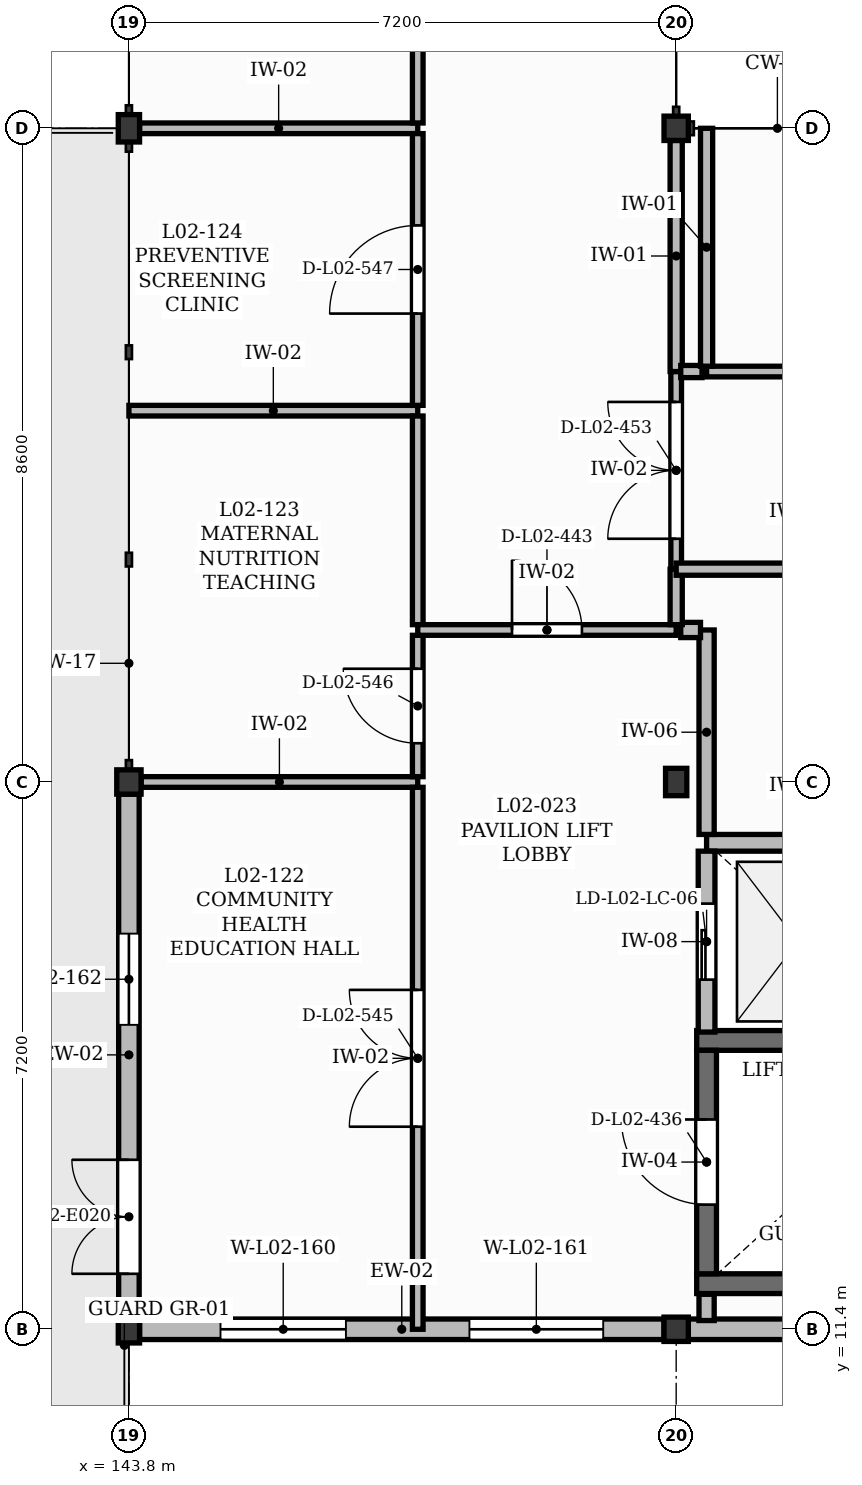
"""IFC4 building model, lengths in metres.
Left out: names, types, materials, properties, quantities, classifications, styles, units other than length and angle.
Written with IfcOpenShell. Run it as: python <this file> out.ifc"""

import sys

from ifc_helpers import new_model, si_unit, direction, frame, frame_2d, origin, origin_2d, place, context, subcontext, project, spatial, rectangle, extrude, element, fill, save


model = new_model("IFC4")
c1 = context("Model", 3, precision=1e-05, world=origin(), true_north=direction((0.0, 1.0)))
c2 = subcontext(c1, "Body", "Model", "MODEL_VIEW")
j1 = project(units=[si_unit("LENGTHUNIT", "METRE"), si_unit("PLANEANGLEUNIT", "RADIAN")], contexts=[c1])
p1 = place(None, origin())
s1 = spatial("IfcSite", under=j1, at=p1, CompositionType="ELEMENT")
p2 = place(p1, origin())
s2 = spatial("IfcBuilding", under=s1, at=p2, CompositionType="ELEMENT")
p3 = place(p2, frame((0.0, 0.0, 9.0)))
s3 = spatial("IfcBuildingStorey", under=s2, at=p3, CompositionType="ELEMENT", Elevation=9.0)
p4 = place(p3, frame((143.8, 11.4, 0.0), z_axis=(0.0, 0.0, 1.0), x_axis=(1.0, 0.0, 0.0)))
e1 = element("IfcColumn", 1, at=p4, inside=s3, PredefinedType="COLUMN", context=c2, shape_type="SweptSolid", body=[
    extrude(rectangle(XDim=0.28, YDim=0.36, at=origin_2d()), origin(), (0.0, 0.0, 1.0), 3.98),
])
p5 = place(p3, frame((143.8, 18.6, 0.0), z_axis=(0.0, 0.0, 1.0), x_axis=(1.0, 0.0, 0.0)))
e2 = element("IfcColumn", 2, at=p5, inside=s3, PredefinedType="COLUMN", context=c2, shape_type="SweptSolid", body=[
    extrude(rectangle(XDim=0.32, YDim=0.32, at=origin_2d()), origin(), (0.0, 0.0, 1.0), 3.98),
])
p6 = place(p3, frame((143.8, 27.2, 0.0), z_axis=(0.0, 0.0, 1.0), x_axis=(1.0, 0.0, 0.0)))
e3 = element("IfcColumn", 3, at=p6, inside=s3, PredefinedType="COLUMN", context=c2, shape_type="SweptSolid", body=[
    extrude(rectangle(XDim=0.28, YDim=0.36, at=origin_2d()), origin(), (0.0, 0.0, 1.0), 3.98),
])
p7 = place(p3, frame((151.0, 11.4, 0.0), z_axis=(0.0, 0.0, 1.0), x_axis=(1.0, 0.0, 0.0)))
e4 = element("IfcColumn", 4, at=p7, inside=s3, PredefinedType="COLUMN", context=c2, shape_type="SweptSolid", body=[
    extrude(rectangle(XDim=0.32, YDim=0.32, at=origin_2d()), origin(), (0.0, 0.0, 1.0), 5.775),
])
p8 = place(p3, frame((151.0, 18.6, 0.0), z_axis=(0.0, 0.0, 1.0), x_axis=(1.0, 0.0, 0.0)))
e5 = element("IfcColumn", 5, at=p8, inside=s3, PredefinedType="COLUMN", context=c2, shape_type="SweptSolid", body=[
    extrude(rectangle(XDim=0.28, YDim=0.36, at=origin_2d()), origin(), (0.0, 0.0, 1.0), 5.775),
])
p9 = place(p3, frame((151.0, 27.2, 0.0), z_axis=(0.0, 0.0, 1.0), x_axis=(1.0, 0.0, 0.0)))
e6 = element("IfcColumn", 6, at=p9, inside=s3, PredefinedType="COLUMN", context=c2, shape_type="SweptSolid", body=[
    extrude(rectangle(XDim=0.32, YDim=0.32, at=origin_2d()), origin(), (0.0, 0.0, 1.0), 5.775),
])
p10 = place(p3, frame((143.94, 11.4, 0.0), z_axis=(0.0, 0.0, 1.0), x_axis=(1.0, 0.0, 0.0)))
e7 = element("IfcWall", 7, at=p10, inside=s3, PredefinedType="SOLIDWALL", context=c2, shape_type="SweptSolid", body=[
    extrude(rectangle(XDim=6.9, YDim=0.27, at=frame_2d((3.45, 0.0))), origin(), (0.0, 0.0, 1.0), 3.54),
])
p11 = place(p10, frame((1.065, 0.0, 1.35)))
e8 = element("IfcOpeningElement", 8, at=p11, cuts=e7, PredefinedType="OPENING", context=c2, shape_type="SweptSolid", body=[
    extrude(rectangle(XDim=1.65, YDim=1.4, at=frame_2d((0.825, 0.7))), frame((0.0, 0.145, 0.0), z_axis=(0.0, -1.0, 0.0), x_axis=(1.0, 0.0, 0.0)), (0.0, 0.0, 1.0), 0.29),
])
p12 = place(p10, frame((4.34, 0.0, 1.0)))
e9 = element("IfcOpeningElement", 9, at=p12, cuts=e7, PredefinedType="OPENING", context=c2, shape_type="SweptSolid", body=[
    extrude(rectangle(XDim=1.76, YDim=1.95, at=frame_2d((0.88, 0.975))), frame((0.0, 0.145, 0.0), z_axis=(0.0, -1.0, 0.0), x_axis=(1.0, 0.0, 0.0)), (0.0, 0.0, 1.0), 0.29),
])
p13 = place(p3, frame((143.8, 11.58, 0.0), z_axis=(0.0, 0.0, 1.0), x_axis=(0.0, 1.0, 0.0)))
e10 = element("IfcWall", 10, at=p13, inside=s3, PredefinedType="SOLIDWALL", context=c2, shape_type="SweptSolid", body=[
    extrude(rectangle(XDim=6.86, YDim=0.27, at=frame_2d((3.43, 0.0))), origin(), (0.0, 0.0, 1.0), 4.0),
])
p14 = place(p13, frame((0.55, 0.0, 0.0)))
e11 = element("IfcOpeningElement", 11, at=p14, cuts=e10, PredefinedType="OPENING", context=c2, shape_type="SweptSolid", body=[
    extrude(rectangle(XDim=1.5, YDim=2.3, at=frame_2d((0.75, 1.15))), frame((0.0, 0.145, 0.0), z_axis=(0.0, -1.0, 0.0), x_axis=(1.0, 0.0, 0.0)), (0.0, 0.0, 1.0), 0.29),
])
p15 = place(p13, frame((3.825, 0.0, 1.0)))
e12 = element("IfcOpeningElement", 12, at=p15, cuts=e10, PredefinedType="OPENING", context=c2, shape_type="SweptSolid", body=[
    extrude(rectangle(XDim=1.2, YDim=1.95, at=frame_2d((0.6, 0.975))), frame((0.0, 0.145, 0.0), z_axis=(0.0, -1.0, 0.0), x_axis=(1.0, 0.0, 0.0)), (0.0, 0.0, 1.0), 0.29),
])
p16 = place(p3, frame((151.16, 11.4, 0.0), z_axis=(0.0, 0.0, 1.0), x_axis=(1.0, 0.0, 0.0)))
e13 = element("IfcWall", 13, at=p16, inside=s3, PredefinedType="SOLIDWALL", context=c2, shape_type="SweptSolid", body=[
    extrude(rectangle(XDim=6.9, YDim=0.27, at=frame_2d((3.45, 0.0))), origin(), (0.0, 0.0, 1.0), 3.54),
])
for number, where, z_axis, x_axis in (
    (14, (151.27, 12.0, 0.0), (0.0, 0.0, 1.0), (1.0, 0.0, 0.0)),
    (15, (151.27, 15.2, 0.0), (0.0, 0.0, 1.0), (1.0, 0.0, 0.0)),
):
    element("IfcWall", number, at=place(p3, frame(where, z_axis=z_axis, x_axis=x_axis)), inside=s3, PredefinedType="SHEAR", context=c2, shape_type="SweptSolid", body=[
        extrude(rectangle(XDim=6.66, YDim=0.26, at=frame_2d((3.33, 0.0))), origin(), (0.0, 0.0, 1.0), 3.95),
    ])
p17 = place(p3, frame((151.4, 12.13, 0.0), z_axis=(0.0, 0.0, 1.0), x_axis=(0.0, 1.0, 0.0)))
e16 = element("IfcWall", 16, at=p17, inside=s3, PredefinedType="SHEAR", context=c2, shape_type="SweptSolid", body=[
    extrude(rectangle(XDim=2.94, YDim=0.26, at=frame_2d((1.47, 0.0))), origin(), (0.0, 0.0, 1.0), 3.95),
])
p18 = place(p17, frame((0.91, 0.0, 0.0)))
e17 = element("IfcOpeningElement", 17, at=p18, cuts=e16, PredefinedType="OPENING", context=c2, shape_type="SweptSolid", body=[
    extrude(rectangle(XDim=1.12, YDim=2.1, at=frame_2d((0.56, 1.05))), frame((0.0, 0.14, 0.0), z_axis=(0.0, -1.0, 0.0), x_axis=(1.0, 0.0, 0.0)), (0.0, 0.0, 1.0), 0.28),
])
p19 = place(p3, frame((151.4, 17.8, 0.0), z_axis=(0.0, 0.0, 1.0), x_axis=(1.0, 0.0, 0.0)))
e18 = element("IfcWall", 18, at=p19, inside=s3, PredefinedType="SOLIDWALL", context=c2, shape_type="SweptSolid", body=[
    extrude(rectangle(XDim=2.4, YDim=0.22, at=frame_2d((1.2, 0.0))), origin(), (0.0, 0.0, 1.0), 3.95),
])
p20 = place(p3, frame((151.4, 15.31, 0.0), z_axis=(0.0, 0.0, 1.0), x_axis=(0.0, 1.0, 0.0)))
e19 = element("IfcWall", 19, at=p20, inside=s3, PredefinedType="SOLIDWALL", context=c2, shape_type="SweptSolid", body=[
    extrude(rectangle(XDim=2.38, YDim=0.22, at=frame_2d((1.19, 0.0))), origin(), (0.0, 0.0, 1.0), 3.95),
])
p21 = place(p20, frame((0.69, 0.0, 0.0)))
e20 = element("IfcOpeningElement", 20, at=p21, cuts=e19, PredefinedType="OPENING", context=c2, shape_type="SweptSolid", body=[
    extrude(rectangle(XDim=1.0, YDim=2.15, at=frame_2d((0.5, 1.075))), frame((0.0, 0.12, 0.0), z_axis=(0.0, -1.0, 0.0), x_axis=(1.0, 0.0, 0.0)), (0.0, 0.0, 1.0), 0.24),
])
p22 = place(p3, frame((143.96, 18.6, 0.0), z_axis=(0.0, 0.0, 1.0), x_axis=(1.0, 0.0, 0.0)))
e21 = element("IfcWall", 21, at=p22, inside=s3, PredefinedType="PARTITIONING", context=c2, shape_type="SweptSolid", body=[
    extrude(rectangle(XDim=3.64, YDim=0.14, at=frame_2d((1.82, 0.0))), origin(), (0.0, 0.0, 1.0), 3.78),
])
p23 = place(p3, frame((143.8, 23.485, 0.0), z_axis=(0.0, 0.0, 1.0), x_axis=(1.0, 0.0, 0.0)))
e22 = element("IfcWall", 22, at=p23, inside=s3, PredefinedType="PARTITIONING", context=c2, shape_type="SweptSolid", body=[
    extrude(rectangle(XDim=3.8, YDim=0.14, at=frame_2d((1.9, 0.0))), origin(), (0.0, 0.0, 1.0), 3.78),
])
p24 = place(p3, frame((143.94, 27.2, 0.0), z_axis=(0.0, 0.0, 1.0), x_axis=(1.0, 0.0, 0.0)))
e23 = element("IfcWall", 23, at=p24, inside=s3, PredefinedType="PARTITIONING", context=c2, shape_type="SweptSolid", body=[
    extrude(rectangle(XDim=3.66, YDim=0.14, at=frame_2d((1.83, 0.0))), origin(), (0.0, 0.0, 1.0), 3.78),
])
p25 = place(p3, frame((147.6, 11.4, 0.0), z_axis=(0.0, 0.0, 1.0), x_axis=(0.0, 1.0, 0.0)))
e24 = element("IfcWall", 24, at=p25, inside=s3, PredefinedType="PARTITIONING", context=c2, shape_type="SweptSolid", body=[
    extrude(rectangle(XDim=7.13, YDim=0.14, at=frame_2d((3.565, 0.0))), origin(), (0.0, 0.0, 1.0), 3.78),
])
p26 = place(p25, frame((2.665, 0.0, 0.0)))
e25 = element("IfcOpeningElement", 25, at=p26, cuts=e24, PredefinedType="OPENING", context=c2, shape_type="SweptSolid", body=[
    extrude(rectangle(XDim=1.8, YDim=2.3, at=frame_2d((0.9, 1.15))), frame((0.0, 0.08, 0.0), z_axis=(0.0, -1.0, 0.0), x_axis=(1.0, 0.0, 0.0)), (0.0, 0.0, 1.0), 0.16),
])
p27 = place(p3, frame((147.6, 18.67, 0.0), z_axis=(0.0, 0.0, 1.0), x_axis=(0.0, 1.0, 0.0)))
e26 = element("IfcWall", 26, at=p27, inside=s3, PredefinedType="PARTITIONING", context=c2, shape_type="SweptSolid", body=[
    extrude(rectangle(XDim=1.86, YDim=0.14, at=frame_2d((0.93, 0.0))), origin(), (0.0, 0.0, 1.0), 3.78),
])
p28 = place(p27, frame((0.44, 0.0, 0.0)))
e27 = element("IfcOpeningElement", 27, at=p28, cuts=e26, PredefinedType="OPENING", context=c2, shape_type="SweptSolid", body=[
    extrude(rectangle(XDim=0.98, YDim=2.15, at=frame_2d((0.49, 1.075))), frame((0.0, 0.08, 0.0), z_axis=(0.0, -1.0, 0.0), x_axis=(1.0, 0.0, 0.0)), (0.0, 0.0, 1.0), 0.16),
])
p29 = place(p3, frame((147.6, 20.67, 0.0), z_axis=(0.0, 0.0, 1.0), x_axis=(0.0, 1.0, 0.0)))
e28 = element("IfcWall", 28, at=p29, inside=s3, PredefinedType="PARTITIONING", context=c2, shape_type="SweptSolid", body=[
    extrude(rectangle(XDim=2.745, YDim=0.14, at=frame_2d((1.373, 0.0))), origin(), (0.0, 0.0, 1.0), 3.78),
])
p30 = place(p3, frame((147.6, 20.6, 0.0), z_axis=(0.0, 0.0, 1.0), x_axis=(1.0, 0.0, 0.0)))
e29 = element("IfcWall", 29, at=p30, inside=s3, PredefinedType="PARTITIONING", context=c2, shape_type="SweptSolid", body=[
    extrude(rectangle(XDim=3.4, YDim=0.14, at=frame_2d((1.7, 0.0))), origin(), (0.0, 0.0, 1.0), 3.78),
])
p31 = place(p30, frame((1.24, 0.0, 0.0)))
e30 = element("IfcOpeningElement", 30, at=p31, cuts=e29, PredefinedType="OPENING", context=c2, shape_type="SweptSolid", body=[
    extrude(rectangle(XDim=0.92, YDim=2.1, at=frame_2d((0.46, 1.05))), frame((0.0, 0.08, 0.0), z_axis=(0.0, -1.0, 0.0), x_axis=(1.0, 0.0, 0.0)), (0.0, 0.0, 1.0), 0.16),
])
p32 = place(p3, frame((147.6, 23.555, 0.0), z_axis=(0.0, 0.0, 1.0), x_axis=(0.0, 1.0, 0.0)))
e31 = element("IfcWall", 31, at=p32, inside=s3, PredefinedType="PARTITIONING", context=c2, shape_type="SweptSolid", body=[
    extrude(rectangle(XDim=3.575, YDim=0.14, at=frame_2d((1.788, 0.0))), origin(), (0.0, 0.0, 1.0), 3.78),
])
p33 = place(p32, frame((1.208, 0.0, 0.0)))
e32 = element("IfcOpeningElement", 32, at=p33, cuts=e31, PredefinedType="OPENING", context=c2, shape_type="SweptSolid", body=[
    extrude(rectangle(XDim=1.16, YDim=2.1, at=frame_2d((0.58, 1.05))), frame((0.0, 0.08, 0.0), z_axis=(0.0, -1.0, 0.0), x_axis=(1.0, 0.0, 0.0)), (0.0, 0.0, 1.0), 0.16),
])
p34 = place(p3, frame((147.6, 27.27, 0.0), z_axis=(0.0, 0.0, 1.0), x_axis=(0.0, 1.0, 0.0)))
e33 = element("IfcWall", 33, at=p34, inside=s3, PredefinedType="PARTITIONING", context=c2, shape_type="SweptSolid", body=[
    extrude(rectangle(XDim=5.226, YDim=0.14, at=frame_2d((2.613, 0.0))), origin(), (0.0, 0.0, 1.0), 3.78),
])
p35 = place(p34, frame((1.713, 0.0, 0.0)))
e34 = element("IfcOpeningElement", 34, at=p35, cuts=e33, PredefinedType="OPENING", context=c2, shape_type="SweptSolid", body=[
    extrude(rectangle(XDim=1.8, YDim=2.3, at=frame_2d((0.9, 1.15))), frame((0.0, 0.08, 0.0), z_axis=(0.0, -1.0, 0.0), x_axis=(1.0, 0.0, 0.0)), (0.0, 0.0, 1.0), 0.16),
])
p36 = place(p3, frame((151.0, 21.4, 0.0), z_axis=(0.0, 0.0, 1.0), x_axis=(0.0, 1.0, 0.0)))
e35 = element("IfcWall", 35, at=p36, inside=s3, PredefinedType="PARTITIONING", context=c2, shape_type="SweptSolid", body=[
    extrude(rectangle(XDim=2.6, YDim=0.14, at=frame_2d((1.3, 0.0))), origin(), (0.0, 0.0, 1.0), 3.78),
])
p37 = place(p36, frame((0.4, 0.0, 0.0)))
e36 = element("IfcOpeningElement", 36, at=p37, cuts=e35, PredefinedType="OPENING", context=c2, shape_type="SweptSolid", body=[
    extrude(rectangle(XDim=1.8, YDim=2.3, at=frame_2d((0.9, 1.15))), frame((0.0, 0.08, 0.0), z_axis=(0.0, -1.0, 0.0), x_axis=(1.0, 0.0, 0.0)), (0.0, 0.0, 1.0), 0.16),
])
p38 = place(p3, frame((151.4, 24.0, 0.0), z_axis=(0.0, 0.0, 1.0), x_axis=(1.0, 0.0, 0.0)))
e37 = element("IfcWall", 37, at=p38, inside=s3, PredefinedType="PARTITIONING", context=c2, shape_type="SweptSolid", body=[
    extrude(rectangle(XDim=6.8, YDim=0.14, at=frame_2d((3.4, 0.0))), origin(), (0.0, 0.0, 1.0), 3.78),
])
p39 = place(p38, frame((2.5, 0.0, 0.0)))
e38 = element("IfcOpeningElement", 38, at=p39, cuts=e37, PredefinedType="OPENING", context=c2, shape_type="SweptSolid", body=[
    extrude(rectangle(XDim=1.8, YDim=2.3, at=frame_2d((0.9, 1.15))), frame((0.0, 0.08, 0.0), z_axis=(0.0, -1.0, 0.0), x_axis=(1.0, 0.0, 0.0)), (0.0, 0.0, 1.0), 0.16),
])
p40 = place(p3, frame((151.4, 11.515, 0.0), z_axis=(0.0, 0.0, 1.0), x_axis=(0.0, 1.0, 0.0)))
e39 = element("IfcWall", 39, at=p40, inside=s3, PredefinedType="PARTITIONING", context=c2, shape_type="SweptSolid", body=[
    extrude(rectangle(XDim=0.345, YDim=0.2, at=frame_2d((0.173, 0.0))), origin(), (0.0, 0.0, 1.0), 3.78),
])
p41 = place(p3, frame((151.4, 17.91, 0.0), z_axis=(0.0, 0.0, 1.0), x_axis=(0.0, 1.0, 0.0)))
e40 = element("IfcWall", 40, at=p41, inside=s3, PredefinedType="PARTITIONING", context=c2, shape_type="SweptSolid", body=[
    extrude(rectangle(XDim=2.69, YDim=0.2, at=frame_2d((1.345, 0.0))), origin(), (0.0, 0.0, 1.0), 3.78),
])
p42 = place(p3, frame((151.32, 20.6, 0.0), z_axis=(0.0, 0.0, 1.0), x_axis=(-1.0, 0.0, 0.0)))
e41 = element("IfcWall", 41, at=p42, inside=s3, PredefinedType="PARTITIONING", context=c2, shape_type="SweptSolid", body=[
    extrude(rectangle(XDim=0.26, YDim=0.2, at=frame_2d((0.13, 0.0))), origin(), (0.0, 0.0, 1.0), 3.78),
])
p43 = place(p3, frame((151.0, 20.67, 0.0), z_axis=(0.0, 0.0, 1.0), x_axis=(0.0, 1.0, 0.0)))
e42 = element("IfcWall", 42, at=p43, inside=s3, PredefinedType="PARTITIONING", context=c2, shape_type="SweptSolid", body=[
    extrude(rectangle(XDim=0.73, YDim=0.16, at=frame_2d((0.365, 0.0))), origin(), (0.0, 0.0, 1.0), 3.78),
])
p44 = place(p3, frame((151.0, 24.0, 0.0), z_axis=(0.0, 0.0, 1.0), x_axis=(0.0, 1.0, 0.0)))
e43 = element("IfcWall", 43, at=p44, inside=s3, PredefinedType="PARTITIONING", context=c2, shape_type="SweptSolid", body=[
    extrude(rectangle(XDim=3.04, YDim=0.16, at=frame_2d((1.52, 0.0))), origin(), (0.0, 0.0, 1.0), 3.78),
])
p45 = place(p3, frame((151.0, 21.4, 0.0), z_axis=(0.0, 0.0, 1.0), x_axis=(1.0, 0.0, 0.0)))
e44 = element("IfcWall", 44, at=p45, inside=s3, PredefinedType="PARTITIONING", context=c2, shape_type="SweptSolid", body=[
    extrude(rectangle(XDim=3.2, YDim=0.16, at=frame_2d((1.6, 0.0))), origin(), (0.0, 0.0, 1.0), 3.78),
])
p46 = place(p3, frame((151.34, 24.0, 0.0), z_axis=(0.0, 0.0, 1.0), x_axis=(-1.0, 0.0, 0.0)))
e45 = element("IfcWall", 45, at=p46, inside=s3, PredefinedType="PARTITIONING", context=c2, shape_type="SweptSolid", body=[
    extrude(rectangle(XDim=0.28, YDim=0.16, at=frame_2d((0.14, 0.0))), origin(), (0.0, 0.0, 1.0), 3.78),
])
p47 = place(p3, frame((151.4, 24.07, 0.0), z_axis=(0.0, 0.0, 1.0), x_axis=(0.0, 1.0, 0.0)))
e46 = element("IfcWall", 46, at=p47, inside=s3, PredefinedType="PARTITIONING", context=c2, shape_type="SweptSolid", body=[
    extrude(rectangle(XDim=3.13, YDim=0.16, at=frame_2d((1.565, 0.0))), origin(), (0.0, 0.0, 1.0), 3.78),
])
p48 = place(p11, origin())
e47 = element("IfcWindow", 47, at=p48, inside=s3, PartitioningType="DOUBLE_PANEL_VERTICAL", PredefinedType="WINDOW", context=c2, shape_type="SweptSolid", body=[
    extrude(rectangle(XDim=1.65, YDim=1.4, at=frame_2d((0.825, 0.7))), frame((0.0, 0.03, 0.0), z_axis=(0.0, -1.0, 0.0), x_axis=(1.0, 0.0, 0.0)), (0.0, 0.0, 1.0), 0.06),
])
fill(e8, e47)
p49 = place(p12, origin())
e48 = element("IfcWindow", 48, at=p49, inside=s3, PartitioningType="DOUBLE_PANEL_VERTICAL", PredefinedType="WINDOW", context=c2, shape_type="SweptSolid", body=[
    extrude(rectangle(XDim=1.76, YDim=1.95, at=frame_2d((0.88, 0.975))), frame((0.0, 0.03, 0.0), z_axis=(0.0, -1.0, 0.0), x_axis=(1.0, 0.0, 0.0)), (0.0, 0.0, 1.0), 0.06),
])
fill(e9, e48)
p50 = place(p14, origin())
e49 = element("IfcDoor", 49, at=p50, inside=s3, OperationType="DOUBLE_DOOR_SINGLE_SWING", PredefinedType="DOOR", context=c2, shape_type="SweptSolid", body=[
    extrude(rectangle(XDim=1.5, YDim=2.3, at=frame_2d((0.75, 1.15))), frame((0.0, 0.025, 0.0), z_axis=(0.0, -1.0, 0.0), x_axis=(1.0, 0.0, 0.0)), (0.0, 0.0, 1.0), 0.05),
])
fill(e11, e49)
p51 = place(p15, origin())
e50 = element("IfcWindow", 50, at=p51, inside=s3, PartitioningType="SINGLE_PANEL", PredefinedType="WINDOW", context=c2, shape_type="SweptSolid", body=[
    extrude(rectangle(XDim=1.2, YDim=1.95, at=frame_2d((0.6, 0.975))), frame((0.0, 0.03, 0.0), z_axis=(0.0, -1.0, 0.0), x_axis=(1.0, 0.0, 0.0)), (0.0, 0.0, 1.0), 0.06),
])
fill(e12, e50)
p52 = place(p21, origin())
e51 = element("IfcDoor", 51, at=p52, inside=s3, OperationType="SLIDING_TO_LEFT", PredefinedType="DOOR", context=c2, shape_type="SweptSolid", body=[
    extrude(rectangle(XDim=1.0, YDim=2.15, at=frame_2d((0.5, 1.075))), frame((0.0, 0.025, 0.0), z_axis=(0.0, -1.0, 0.0), x_axis=(1.0, 0.0, 0.0)), (0.0, 0.0, 1.0), 0.05),
])
fill(e20, e51)
p53 = place(p18, origin())
e52 = element("IfcDoor", 52, at=p53, inside=s3, OperationType="SINGLE_SWING_RIGHT", PredefinedType="DOOR", context=c2, shape_type="SweptSolid", body=[
    extrude(rectangle(XDim=1.12, YDim=2.1, at=frame_2d((0.56, 1.05))), frame((0.0, 0.025, 0.0), z_axis=(0.0, -1.0, 0.0), x_axis=(1.0, 0.0, 0.0)), (0.0, 0.0, 1.0), 0.05),
])
fill(e17, e52)
p54 = place(p31, origin())
e53 = element("IfcDoor", 53, at=p54, inside=s3, OperationType="SINGLE_SWING_LEFT", PredefinedType="DOOR", context=c2, shape_type="SweptSolid", body=[
    extrude(rectangle(XDim=0.92, YDim=2.1, at=frame_2d((0.46, 1.05))), frame((0.0, 0.025, 0.0), z_axis=(0.0, -1.0, 0.0), x_axis=(1.0, 0.0, 0.0)), (0.0, 0.0, 1.0), 0.05),
])
fill(e30, e53)
p55 = place(p37, origin())
e54 = element("IfcDoor", 54, at=p55, inside=s3, OperationType="DOUBLE_DOOR_SINGLE_SWING", PredefinedType="DOOR", context=c2, shape_type="SweptSolid", body=[
    extrude(rectangle(XDim=1.8, YDim=2.3, at=frame_2d((0.9, 1.15))), frame((0.0, 0.025, 0.0), z_axis=(0.0, -1.0, 0.0), x_axis=(1.0, 0.0, 0.0)), (0.0, 0.0, 1.0), 0.05),
])
fill(e36, e54)
p56 = place(p26, origin())
e55 = element("IfcDoor", 55, at=p56, inside=s3, OperationType="DOUBLE_DOOR_SINGLE_SWING", PredefinedType="DOOR", context=c2, shape_type="SweptSolid", body=[
    extrude(rectangle(XDim=1.8, YDim=2.3, at=frame_2d((0.9, 1.15))), frame((0.0, 0.025, 0.0), z_axis=(0.0, -1.0, 0.0), x_axis=(1.0, 0.0, 0.0)), (0.0, 0.0, 1.0), 0.05),
])
fill(e25, e55)
p57 = place(p28, origin())
e56 = element("IfcDoor", 56, at=p57, inside=s3, OperationType="SINGLE_SWING_RIGHT", PredefinedType="DOOR", context=c2, shape_type="SweptSolid", body=[
    extrude(rectangle(XDim=0.98, YDim=2.15, at=frame_2d((0.49, 1.075))), frame((0.0, 0.025, 0.0), z_axis=(0.0, -1.0, 0.0), x_axis=(1.0, 0.0, 0.0)), (0.0, 0.0, 1.0), 0.05),
])
fill(e27, e56)
p58 = place(p33, origin())
e57 = element("IfcDoor", 57, at=p58, inside=s3, OperationType="SINGLE_SWING_LEFT", PredefinedType="DOOR", context=c2, shape_type="SweptSolid", body=[
    extrude(rectangle(XDim=1.16, YDim=2.1, at=frame_2d((0.58, 1.05))), frame((0.0, 0.025, 0.0), z_axis=(0.0, -1.0, 0.0), x_axis=(1.0, 0.0, 0.0)), (0.0, 0.0, 1.0), 0.05),
])
fill(e32, e57)
save(model, sys.argv[1])
